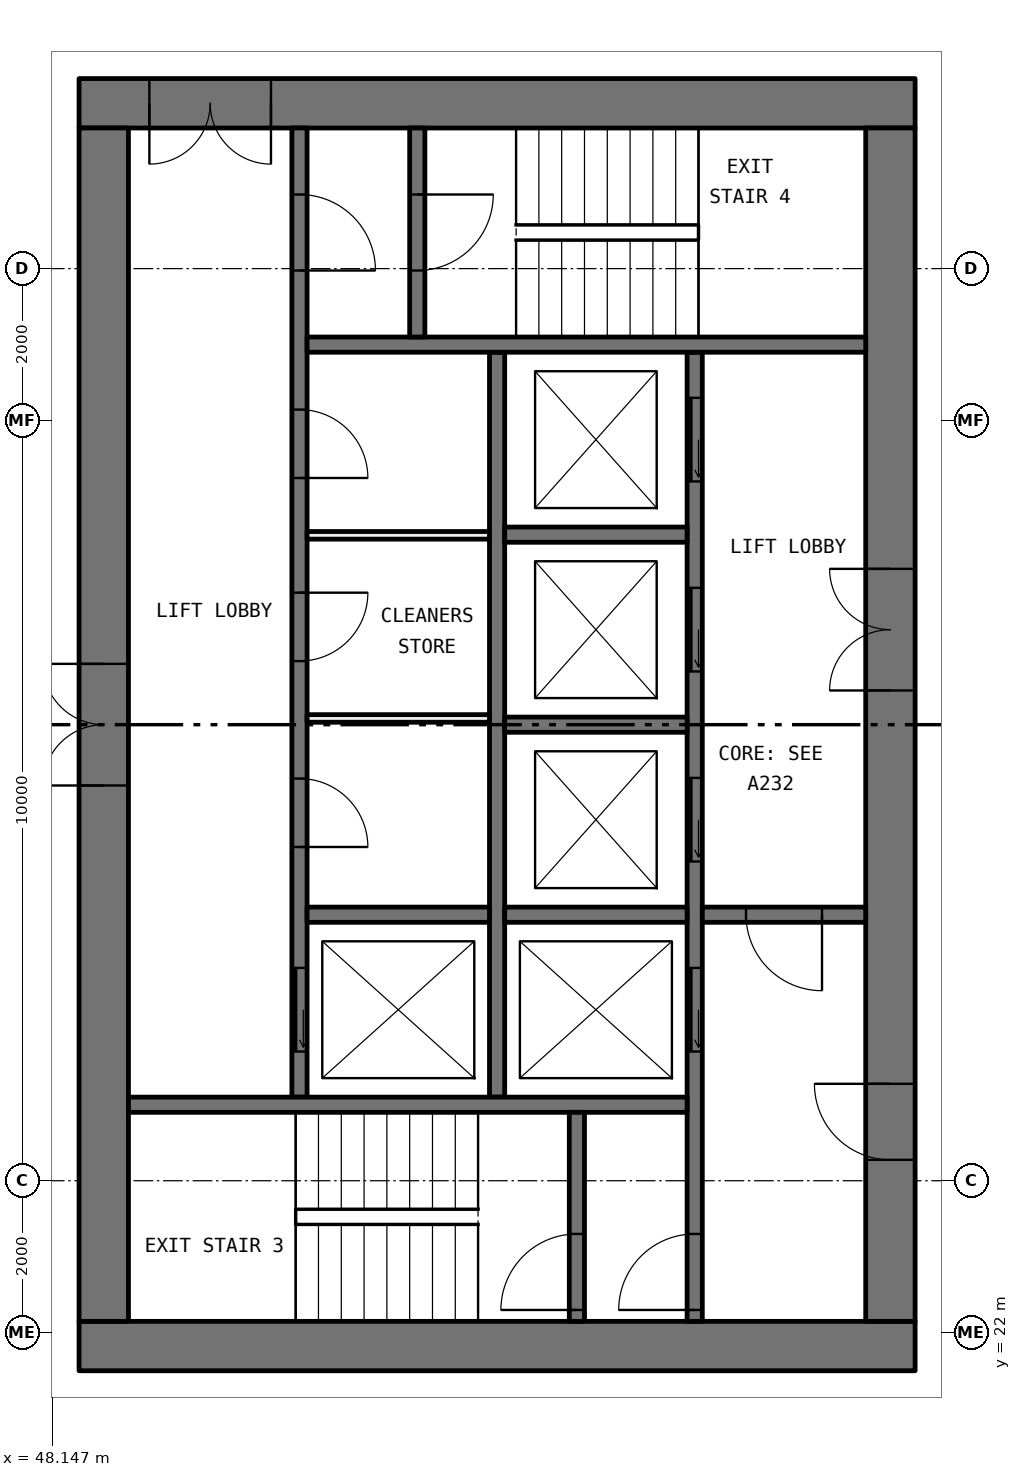
"""IFC4 building model, lengths in metres.
Left out: names, types, materials, properties, quantities, classifications, styles, units other than length and angle.
Written with IfcOpenShell. Run it as: python <this file> out.ifc"""

import sys

from ifc_helpers import new_model, si_unit, direction, frame, frame_2d, origin, place, context, subcontext, project, spatial, rectangle, extrude, element, fill, save


model = new_model("IFC4")
c1 = context("Model", 3, precision=1e-05, world=origin(), true_north=direction((0.0, 1.0)))
c2 = subcontext(c1, "Body", "Model", "MODEL_VIEW")
j1 = project(units=[si_unit("LENGTHUNIT", "METRE"), si_unit("PLANEANGLEUNIT", "RADIAN")], contexts=[c1])
p1 = place(None, origin())
s1 = spatial("IfcSite", under=j1, at=p1, CompositionType="ELEMENT")
p2 = place(p1, origin())
s2 = spatial("IfcBuilding", under=s1, at=p2, CompositionType="ELEMENT")
p3 = place(p2, frame((0.0, 0.0, 120.75)))
s3 = spatial("IfcBuildingStorey", under=s2, at=p3, CompositionType="ELEMENT", Elevation=120.75)
p4 = place(p3, frame((59.5, 21.825, 0.0), z_axis=(0.0, 0.0, 1.0), x_axis=(-1.0, 0.0, 0.0)))
e1 = element("IfcWall", 1, at=p4, inside=s3, PredefinedType="SHEAR", context=c2, shape_type="SweptSolid", body=[
    extrude(rectangle(XDim=11.0, YDim=0.65, at=frame_2d((5.5, 0.0))), origin(), (0.0, 0.0, 1.0), 3.05),
])
p5 = place(p3, frame((59.5, 38.175, 0.0), z_axis=(0.0, 0.0, 1.0), x_axis=(-1.0, 0.0, 0.0)))
e2 = element("IfcWall", 2, at=p5, inside=s3, PredefinedType="SHEAR", context=c2, shape_type="SweptSolid", body=[
    extrude(rectangle(XDim=11.0, YDim=0.65, at=frame_2d((5.5, 0.0))), origin(), (0.0, 0.0, 1.0), 3.05),
])
p6 = place(p5, frame((8.475, 0.0, 0.0)))
e3 = element("IfcOpeningElement", 3, at=p6, cuts=e2, PredefinedType="OPENING", context=c2, shape_type="SweptSolid", body=[
    extrude(rectangle(XDim=1.6, YDim=2.1, at=frame_2d((0.8, 1.05))), frame((0.0, 0.335, 0.0), z_axis=(0.0, -1.0, 0.0), x_axis=(1.0, 0.0, 0.0)), (0.0, 0.0, 1.0), 0.67),
])
p7 = place(p3, frame((59.175, 22.15, 0.0), z_axis=(0.0, 0.0, 1.0), x_axis=(0.0, 1.0, 0.0)))
e4 = element("IfcWall", 4, at=p7, inside=s3, PredefinedType="SHEAR", context=c2, shape_type="SweptSolid", body=[
    extrude(rectangle(XDim=15.7, YDim=0.65, at=frame_2d((7.85, 0.0))), origin(), (0.0, 0.0, 1.0), 3.05),
])
p8 = place(p7, frame((8.3, 0.0, 0.0)))
e5 = element("IfcOpeningElement", 5, at=p8, cuts=e4, PredefinedType="OPENING", context=c2, shape_type="SweptSolid", body=[
    extrude(rectangle(XDim=1.6, YDim=2.1, at=frame_2d((0.8, 1.05))), frame((0.0, 0.335, 0.0), z_axis=(0.0, -1.0, 0.0), x_axis=(1.0, 0.0, 0.0)), (0.0, 0.0, 1.0), 0.67),
])
p9 = place(p7, frame((2.125, 0.0, 0.0)))
e6 = element("IfcOpeningElement", 6, at=p9, cuts=e4, PredefinedType="OPENING", context=c2, shape_type="SweptSolid", body=[
    extrude(rectangle(XDim=1.0, YDim=2.1, at=frame_2d((0.5, 1.05))), frame((0.0, 0.335, 0.0), z_axis=(0.0, -1.0, 0.0), x_axis=(1.0, 0.0, 0.0)), (0.0, 0.0, 1.0), 0.67),
])
p10 = place(p3, frame((48.825, 22.15, 0.0), z_axis=(0.0, 0.0, 1.0), x_axis=(0.0, 1.0, 0.0)))
e7 = element("IfcWall", 7, at=p10, inside=s3, PredefinedType="SHEAR", context=c2, shape_type="SweptSolid", body=[
    extrude(rectangle(XDim=15.7, YDim=0.65, at=frame_2d((7.85, 0.0))), origin(), (0.0, 0.0, 1.0), 3.05),
])
p11 = place(p10, frame((7.05, 0.0, 0.0)))
e8 = element("IfcOpeningElement", 8, at=p11, cuts=e7, PredefinedType="OPENING", context=c2, shape_type="SweptSolid", body=[
    extrude(rectangle(XDim=1.6, YDim=2.1, at=frame_2d((0.8, 1.05))), frame((0.0, 0.335, 0.0), z_axis=(0.0, -1.0, 0.0), x_axis=(1.0, 0.0, 0.0)), (0.0, 0.0, 1.0), 0.67),
])
p12 = place(p3, frame((56.6, 22.15, 0.0), z_axis=(0.0, 0.0, 1.0), x_axis=(0.0, 1.0, 0.0)))
e9 = element("IfcWall", 9, at=p12, inside=s3, PredefinedType="SOLIDWALL", context=c2, shape_type="SweptSolid", body=[
    extrude(rectangle(XDim=12.75, YDim=0.2, at=frame_2d((6.375, 0.0))), origin(), (0.0, 0.0, 1.0), 3.05),
])
p13 = place(p12, frame((3.55, 0.0, 0.0)))
e10 = element("IfcOpeningElement", 10, at=p13, cuts=e9, PredefinedType="OPENING", context=c2, shape_type="SweptSolid", body=[
    extrude(rectangle(XDim=1.1, YDim=2.1, at=frame_2d((0.55, 1.05))), frame((0.0, 0.11, 0.0), z_axis=(0.0, -1.0, 0.0), x_axis=(1.0, 0.0, 0.0)), (0.0, 0.0, 1.0), 0.22),
])
p14 = place(p12, frame((6.05, 0.0, 0.0)))
e11 = element("IfcOpeningElement", 11, at=p14, cuts=e9, PredefinedType="OPENING", context=c2, shape_type="SweptSolid", body=[
    extrude(rectangle(XDim=1.1, YDim=2.1, at=frame_2d((0.55, 1.05))), frame((0.0, 0.11, 0.0), z_axis=(0.0, -1.0, 0.0), x_axis=(1.0, 0.0, 0.0)), (0.0, 0.0, 1.0), 0.22),
])
p15 = place(p12, frame((8.55, 0.0, 0.0)))
e12 = element("IfcOpeningElement", 12, at=p15, cuts=e9, PredefinedType="OPENING", context=c2, shape_type="SweptSolid", body=[
    extrude(rectangle(XDim=1.1, YDim=2.1, at=frame_2d((0.55, 1.05))), frame((0.0, 0.11, 0.0), z_axis=(0.0, -1.0, 0.0), x_axis=(1.0, 0.0, 0.0)), (0.0, 0.0, 1.0), 0.22),
])
p16 = place(p12, frame((11.05, 0.0, 0.0)))
e13 = element("IfcOpeningElement", 13, at=p16, cuts=e9, PredefinedType="OPENING", context=c2, shape_type="SweptSolid", body=[
    extrude(rectangle(XDim=1.1, YDim=2.1, at=frame_2d((0.55, 1.05))), frame((0.0, 0.11, 0.0), z_axis=(0.0, -1.0, 0.0), x_axis=(1.0, 0.0, 0.0)), (0.0, 0.0, 1.0), 0.22),
])
p17 = place(p12, frame((0.15, 0.0, 0.0)))
e14 = element("IfcOpeningElement", 14, at=p17, cuts=e9, PredefinedType="OPENING", context=c2, shape_type="SweptSolid", body=[
    extrude(rectangle(XDim=1.0, YDim=2.1, at=frame_2d((0.5, 1.05))), frame((0.0, 0.11, 0.0), z_axis=(0.0, -1.0, 0.0), x_axis=(1.0, 0.0, 0.0)), (0.0, 0.0, 1.0), 0.22),
])
p18 = place(p3, frame((51.4, 25.1, 0.0), z_axis=(0.0, 0.0, 1.0), x_axis=(0.0, 1.0, 0.0)))
e15 = element("IfcWall", 15, at=p18, inside=s3, PredefinedType="SOLIDWALL", context=c2, shape_type="SweptSolid", body=[
    extrude(rectangle(XDim=12.75, YDim=0.2, at=frame_2d((6.375, 0.0))), origin(), (0.0, 0.0, 1.0), 3.05),
])
p19 = place(p18, frame((0.6, 0.0, 0.0)))
e16 = element("IfcOpeningElement", 16, at=p19, cuts=e15, PredefinedType="OPENING", context=c2, shape_type="SweptSolid", body=[
    extrude(rectangle(XDim=1.1, YDim=2.1, at=frame_2d((0.55, 1.05))), frame((0.0, 0.11, 0.0), z_axis=(0.0, -1.0, 0.0), x_axis=(1.0, 0.0, 0.0)), (0.0, 0.0, 1.0), 0.22),
])
p20 = place(p18, frame((10.875, 0.0, 0.0)))
e17 = element("IfcOpeningElement", 17, at=p20, cuts=e15, PredefinedType="OPENING", context=c2, shape_type="SweptSolid", body=[
    extrude(rectangle(XDim=1.0, YDim=2.1, at=frame_2d((0.5, 1.05))), frame((0.0, 0.11, 0.0), z_axis=(0.0, -1.0, 0.0), x_axis=(1.0, 0.0, 0.0)), (0.0, 0.0, 1.0), 0.22),
])
p21 = place(p18, frame((3.291, 0.0, 0.0)))
e18 = element("IfcOpeningElement", 18, at=p21, cuts=e15, PredefinedType="OPENING", context=c2, shape_type="SweptSolid", body=[
    extrude(rectangle(XDim=0.9, YDim=2.1, at=frame_2d((0.45, 1.05))), frame((0.0, 0.11, 0.0), z_axis=(0.0, -1.0, 0.0), x_axis=(1.0, 0.0, 0.0)), (0.0, 0.0, 1.0), 0.22),
])
p22 = place(p18, frame((5.737, 0.0, 0.0)))
e19 = element("IfcOpeningElement", 19, at=p22, cuts=e15, PredefinedType="OPENING", context=c2, shape_type="SweptSolid", body=[
    extrude(rectangle(XDim=0.9, YDim=2.1, at=frame_2d((0.45, 1.05))), frame((0.0, 0.11, 0.0), z_axis=(0.0, -1.0, 0.0), x_axis=(1.0, 0.0, 0.0)), (0.0, 0.0, 1.0), 0.22),
])
p23 = place(p18, frame((8.146, 0.0, 0.0)))
e20 = element("IfcOpeningElement", 20, at=p23, cuts=e15, PredefinedType="OPENING", context=c2, shape_type="SweptSolid", body=[
    extrude(rectangle(XDim=0.9, YDim=2.1, at=frame_2d((0.45, 1.05))), frame((0.0, 0.11, 0.0), z_axis=(0.0, -1.0, 0.0), x_axis=(1.0, 0.0, 0.0)), (0.0, 0.0, 1.0), 0.22),
])
p24 = place(p3, frame((54.0, 25.1, 0.0), z_axis=(0.0, 0.0, 1.0), x_axis=(0.0, 1.0, 0.0)))
e21 = element("IfcWall", 21, at=p24, inside=s3, PredefinedType="SOLIDWALL", context=c2, shape_type="SweptSolid", body=[
    extrude(rectangle(XDim=9.8, YDim=0.2, at=frame_2d((4.9, 0.0))), origin(), (0.0, 0.0, 1.0), 3.05),
])
for number, where, z_axis, x_axis in (
    (22, (56.5, 25.0, 0.0), (0.0, 0.0, 1.0), (-1.0, 0.0, 0.0)),
    (23, (58.85, 35.0, 0.0), (0.0, 0.0, 1.0), (-1.0, 0.0, 0.0)),
):
    element("IfcWall", number, at=place(p3, frame(where, z_axis=z_axis, x_axis=x_axis)), inside=s3, PredefinedType="SOLIDWALL", context=c2, shape_type="SweptSolid", body=[
        extrude(rectangle(XDim=7.35, YDim=0.2, at=frame_2d((3.675, 0.0))), origin(), (0.0, 0.0, 1.0), 3.05),
    ])
p25 = place(p3, frame((58.85, 27.5, 0.0), z_axis=(0.0, 0.0, 1.0), x_axis=(-1.0, 0.0, 0.0)))
e24 = element("IfcWall", 24, at=p25, inside=s3, PredefinedType="SOLIDWALL", context=c2, shape_type="SweptSolid", body=[
    extrude(rectangle(XDim=2.15, YDim=0.2, at=frame_2d((1.075, 0.0))), origin(), (0.0, 0.0, 1.0), 3.05),
])
p26 = place(p25, frame((0.575, 0.0, 0.0)))
e25 = element("IfcOpeningElement", 25, at=p26, cuts=e24, PredefinedType="OPENING", context=c2, shape_type="SweptSolid", body=[
    extrude(rectangle(XDim=1.0, YDim=2.1, at=frame_2d((0.5, 1.05))), frame((0.0, 0.11, 0.0), z_axis=(0.0, -1.0, 0.0), x_axis=(1.0, 0.0, 0.0)), (0.0, 0.0, 1.0), 0.22),
])
p27 = place(p3, frame((55.05, 22.15, 0.0), z_axis=(0.0, 0.0, 1.0), x_axis=(0.0, 1.0, 0.0)))
e26 = element("IfcWall", 26, at=p27, inside=s3, PredefinedType="SOLIDWALL", context=c2, shape_type="SweptSolid", body=[
    extrude(rectangle(XDim=2.75, YDim=0.2, at=frame_2d((1.375, 0.0))), origin(), (0.0, 0.0, 1.0), 3.05),
])
p28 = place(p27, frame((0.15, 0.0, 0.0)))
e27 = element("IfcOpeningElement", 27, at=p28, cuts=e26, PredefinedType="OPENING", context=c2, shape_type="SweptSolid", body=[
    extrude(rectangle(XDim=1.0, YDim=2.1, at=frame_2d((0.5, 1.05))), frame((0.0, 0.11, 0.0), z_axis=(0.0, -1.0, 0.0), x_axis=(1.0, 0.0, 0.0)), (0.0, 0.0, 1.0), 0.22),
])
p29 = place(p3, frame((52.95, 35.1, 0.0), z_axis=(0.0, 0.0, 1.0), x_axis=(0.0, 1.0, 0.0)))
e28 = element("IfcWall", 28, at=p29, inside=s3, PredefinedType="SOLIDWALL", context=c2, shape_type="SweptSolid", body=[
    extrude(rectangle(XDim=2.75, YDim=0.2, at=frame_2d((1.375, 0.0))), origin(), (0.0, 0.0, 1.0), 3.05),
])
p30 = place(p29, frame((0.875, 0.0, 0.0)))
e29 = element("IfcOpeningElement", 29, at=p30, cuts=e28, PredefinedType="OPENING", context=c2, shape_type="SweptSolid", body=[
    extrude(rectangle(XDim=1.0, YDim=2.1, at=frame_2d((0.5, 1.05))), frame((0.0, 0.11, 0.0), z_axis=(0.0, -1.0, 0.0), x_axis=(1.0, 0.0, 0.0)), (0.0, 0.0, 1.0), 0.22),
])
for number, where, z_axis, x_axis in (
    (30, (56.5, 27.5, 0.0), (0.0, 0.0, 1.0), (-1.0, 0.0, 0.0)),
    (31, (56.5, 30.0, 0.0), (0.0, 0.0, 1.0), (-1.0, 0.0, 0.0)),
    (32, (56.5, 32.5, 0.0), (0.0, 0.0, 1.0), (-1.0, 0.0, 0.0)),
    (33, (53.9, 27.5, 0.0), (0.0, 0.0, 1.0), (-1.0, 0.0, 0.0)),
):
    element("IfcWall", number, at=place(p3, frame(where, z_axis=z_axis, x_axis=x_axis)), inside=s3, PredefinedType="SOLIDWALL", context=c2, shape_type="SweptSolid", body=[
        extrude(rectangle(XDim=2.4, YDim=0.2, at=frame_2d((1.2, 0.0))), origin(), (0.0, 0.0, 1.0), 3.05),
    ])
for number, where, z_axis, x_axis in (
    (34, (53.9, 30.082, 0.0), (0.0, 0.0, 1.0), (-1.0, 0.0, 0.0)),
    (35, (53.9, 32.491, 0.0), (0.0, 0.0, 1.0), (-1.0, 0.0, 0.0)),
):
    element("IfcWall", number, at=place(p3, frame(where, z_axis=z_axis, x_axis=x_axis)), inside=s3, PredefinedType="PARTITIONING", context=c2, shape_type="SweptSolid", body=[
        extrude(rectangle(XDim=2.4, YDim=0.1, at=frame_2d((1.2, 0.0))), origin(), (0.0, 0.0, 1.0), 3.05),
    ])
p31 = place(p19, origin())
e36 = element("IfcDoor", 36, at=p31, inside=s3, OperationType="SLIDING_TO_LEFT", PredefinedType="DOOR", context=c2, shape_type="SweptSolid", body=[
    extrude(rectangle(XDim=1.1, YDim=2.1, at=frame_2d((0.55, 1.05))), frame((0.0, 0.025, 0.0), z_axis=(0.0, -1.0, 0.0), x_axis=(1.0, 0.0, 0.0)), (0.0, 0.0, 1.0), 0.05),
])
fill(e16, e36)
p32 = place(p13, origin())
e37 = element("IfcDoor", 37, at=p32, inside=s3, OperationType="SLIDING_TO_LEFT", PredefinedType="DOOR", context=c2, shape_type="SweptSolid", body=[
    extrude(rectangle(XDim=1.1, YDim=2.1, at=frame_2d((0.55, 1.05))), frame((0.0, 0.025, 0.0), z_axis=(0.0, -1.0, 0.0), x_axis=(1.0, 0.0, 0.0)), (0.0, 0.0, 1.0), 0.05),
])
fill(e10, e37)
p33 = place(p14, origin())
e38 = element("IfcDoor", 38, at=p33, inside=s3, OperationType="SLIDING_TO_LEFT", PredefinedType="DOOR", context=c2, shape_type="SweptSolid", body=[
    extrude(rectangle(XDim=1.1, YDim=2.1, at=frame_2d((0.55, 1.05))), frame((0.0, 0.025, 0.0), z_axis=(0.0, -1.0, 0.0), x_axis=(1.0, 0.0, 0.0)), (0.0, 0.0, 1.0), 0.05),
])
fill(e11, e38)
p34 = place(p15, origin())
e39 = element("IfcDoor", 39, at=p34, inside=s3, OperationType="SLIDING_TO_LEFT", PredefinedType="DOOR", context=c2, shape_type="SweptSolid", body=[
    extrude(rectangle(XDim=1.1, YDim=2.1, at=frame_2d((0.55, 1.05))), frame((0.0, 0.025, 0.0), z_axis=(0.0, -1.0, 0.0), x_axis=(1.0, 0.0, 0.0)), (0.0, 0.0, 1.0), 0.05),
])
fill(e12, e39)
p35 = place(p16, origin())
e40 = element("IfcDoor", 40, at=p35, inside=s3, OperationType="SLIDING_TO_LEFT", PredefinedType="DOOR", context=c2, shape_type="SweptSolid", body=[
    extrude(rectangle(XDim=1.1, YDim=2.1, at=frame_2d((0.55, 1.05))), frame((0.0, 0.025, 0.0), z_axis=(0.0, -1.0, 0.0), x_axis=(1.0, 0.0, 0.0)), (0.0, 0.0, 1.0), 0.05),
])
fill(e13, e40)
p36 = place(p28, origin())
e41 = element("IfcDoor", 41, at=p36, inside=s3, OperationType="SINGLE_SWING_RIGHT", PredefinedType="DOOR", context=c2, shape_type="SweptSolid", body=[
    extrude(rectangle(XDim=1.0, YDim=2.1, at=frame_2d((0.5, 1.05))), frame((0.0, 0.025, 0.0), z_axis=(0.0, -1.0, 0.0), x_axis=(1.0, 0.0, 0.0)), (0.0, 0.0, 1.0), 0.05),
])
fill(e27, e41)
p37 = place(p17, origin())
e42 = element("IfcDoor", 42, at=p37, inside=s3, OperationType="SINGLE_SWING_RIGHT", PredefinedType="DOOR", context=c2, shape_type="SweptSolid", body=[
    extrude(rectangle(XDim=1.0, YDim=2.1, at=frame_2d((0.5, 1.05))), frame((0.0, 0.025, 0.0), z_axis=(0.0, -1.0, 0.0), x_axis=(1.0, 0.0, 0.0)), (0.0, 0.0, 1.0), 0.05),
])
fill(e14, e42)
p38 = place(p20, frame((1.0, 0.0, 0.0), x_axis=(-1.0, 0.0, 0.0)))
e43 = element("IfcDoor", 43, at=p38, inside=s3, OperationType="SINGLE_SWING_LEFT", PredefinedType="DOOR", context=c2, shape_type="SweptSolid", body=[
    extrude(rectangle(XDim=1.0, YDim=2.1, at=frame_2d((0.5, 1.05))), frame((0.0, 0.025, 0.0), z_axis=(0.0, -1.0, 0.0), x_axis=(1.0, 0.0, 0.0)), (0.0, 0.0, 1.0), 0.05),
])
fill(e17, e43)
p39 = place(p30, frame((1.0, 0.0, 0.0), x_axis=(-1.0, 0.0, 0.0)))
e44 = element("IfcDoor", 44, at=p39, inside=s3, OperationType="SINGLE_SWING_RIGHT", PredefinedType="DOOR", context=c2, shape_type="SweptSolid", body=[
    extrude(rectangle(XDim=1.0, YDim=2.1, at=frame_2d((0.5, 1.05))), frame((0.0, 0.025, 0.0), z_axis=(0.0, -1.0, 0.0), x_axis=(1.0, 0.0, 0.0)), (0.0, 0.0, 1.0), 0.05),
])
fill(e29, e44)
p40 = place(p26, origin())
e45 = element("IfcDoor", 45, at=p40, inside=s3, OperationType="SINGLE_SWING_RIGHT", PredefinedType="DOOR", context=c2, shape_type="SweptSolid", body=[
    extrude(rectangle(XDim=1.0, YDim=2.1, at=frame_2d((0.5, 1.05))), frame((0.0, 0.025, 0.0), z_axis=(0.0, -1.0, 0.0), x_axis=(1.0, 0.0, 0.0)), (0.0, 0.0, 1.0), 0.05),
])
fill(e25, e45)
p41 = place(p8, origin())
e46 = element("IfcDoor", 46, at=p41, inside=s3, OperationType="DOUBLE_DOOR_SINGLE_SWING", PredefinedType="DOOR", context=c2, shape_type="SweptSolid", body=[
    extrude(rectangle(XDim=1.6, YDim=2.1, at=frame_2d((0.8, 1.05))), frame((0.0, 0.025, 0.0), z_axis=(0.0, -1.0, 0.0), x_axis=(1.0, 0.0, 0.0)), (0.0, 0.0, 1.0), 0.05),
])
fill(e5, e46)
p42 = place(p9, origin())
e47 = element("IfcDoor", 47, at=p42, inside=s3, OperationType="SINGLE_SWING_LEFT", PredefinedType="DOOR", context=c2, shape_type="SweptSolid", body=[
    extrude(rectangle(XDim=1.0, YDim=2.1, at=frame_2d((0.5, 1.05))), frame((0.0, 0.025, 0.0), z_axis=(0.0, -1.0, 0.0), x_axis=(1.0, 0.0, 0.0)), (0.0, 0.0, 1.0), 0.05),
])
fill(e6, e47)
p43 = place(p6, origin())
e48 = element("IfcDoor", 48, at=p43, inside=s3, OperationType="DOUBLE_DOOR_SINGLE_SWING", PredefinedType="DOOR", context=c2, shape_type="SweptSolid", body=[
    extrude(rectangle(XDim=1.6, YDim=2.1, at=frame_2d((0.8, 1.05))), frame((0.0, 0.025, 0.0), z_axis=(0.0, -1.0, 0.0), x_axis=(1.0, 0.0, 0.0)), (0.0, 0.0, 1.0), 0.05),
])
fill(e3, e48)
p44 = place(p11, origin())
e49 = element("IfcDoor", 49, at=p44, inside=s3, OperationType="DOUBLE_DOOR_SINGLE_SWING", PredefinedType="DOOR", context=c2, shape_type="SweptSolid", body=[
    extrude(rectangle(XDim=1.6, YDim=2.1, at=frame_2d((0.8, 1.05))), frame((0.0, 0.025, 0.0), z_axis=(0.0, -1.0, 0.0), x_axis=(1.0, 0.0, 0.0)), (0.0, 0.0, 1.0), 0.05),
])
fill(e8, e49)
p45 = place(p21, frame((0.9, 0.0, 0.0), x_axis=(-1.0, 0.0, 0.0)))
e50 = element("IfcDoor", 50, at=p45, inside=s3, OperationType="SINGLE_SWING_LEFT", PredefinedType="DOOR", context=c2, shape_type="SweptSolid", body=[
    extrude(rectangle(XDim=0.9, YDim=2.1, at=frame_2d((0.45, 1.05))), frame((0.0, 0.025, 0.0), z_axis=(0.0, -1.0, 0.0), x_axis=(1.0, 0.0, 0.0)), (0.0, 0.0, 1.0), 0.05),
])
fill(e18, e50)
p46 = place(p22, frame((0.9, 0.0, 0.0), x_axis=(-1.0, 0.0, 0.0)))
e51 = element("IfcDoor", 51, at=p46, inside=s3, OperationType="SINGLE_SWING_RIGHT", PredefinedType="DOOR", context=c2, shape_type="SweptSolid", body=[
    extrude(rectangle(XDim=0.9, YDim=2.1, at=frame_2d((0.45, 1.05))), frame((0.0, 0.025, 0.0), z_axis=(0.0, -1.0, 0.0), x_axis=(1.0, 0.0, 0.0)), (0.0, 0.0, 1.0), 0.05),
])
fill(e19, e51)
p47 = place(p23, frame((0.9, 0.0, 0.0), x_axis=(-1.0, 0.0, 0.0)))
e52 = element("IfcDoor", 52, at=p47, inside=s3, OperationType="SINGLE_SWING_LEFT", PredefinedType="DOOR", context=c2, shape_type="SweptSolid", body=[
    extrude(rectangle(XDim=0.9, YDim=2.1, at=frame_2d((0.45, 1.05))), frame((0.0, 0.025, 0.0), z_axis=(0.0, -1.0, 0.0), x_axis=(1.0, 0.0, 0.0)), (0.0, 0.0, 1.0), 0.05),
])
fill(e20, e52)
save(model, sys.argv[1])
